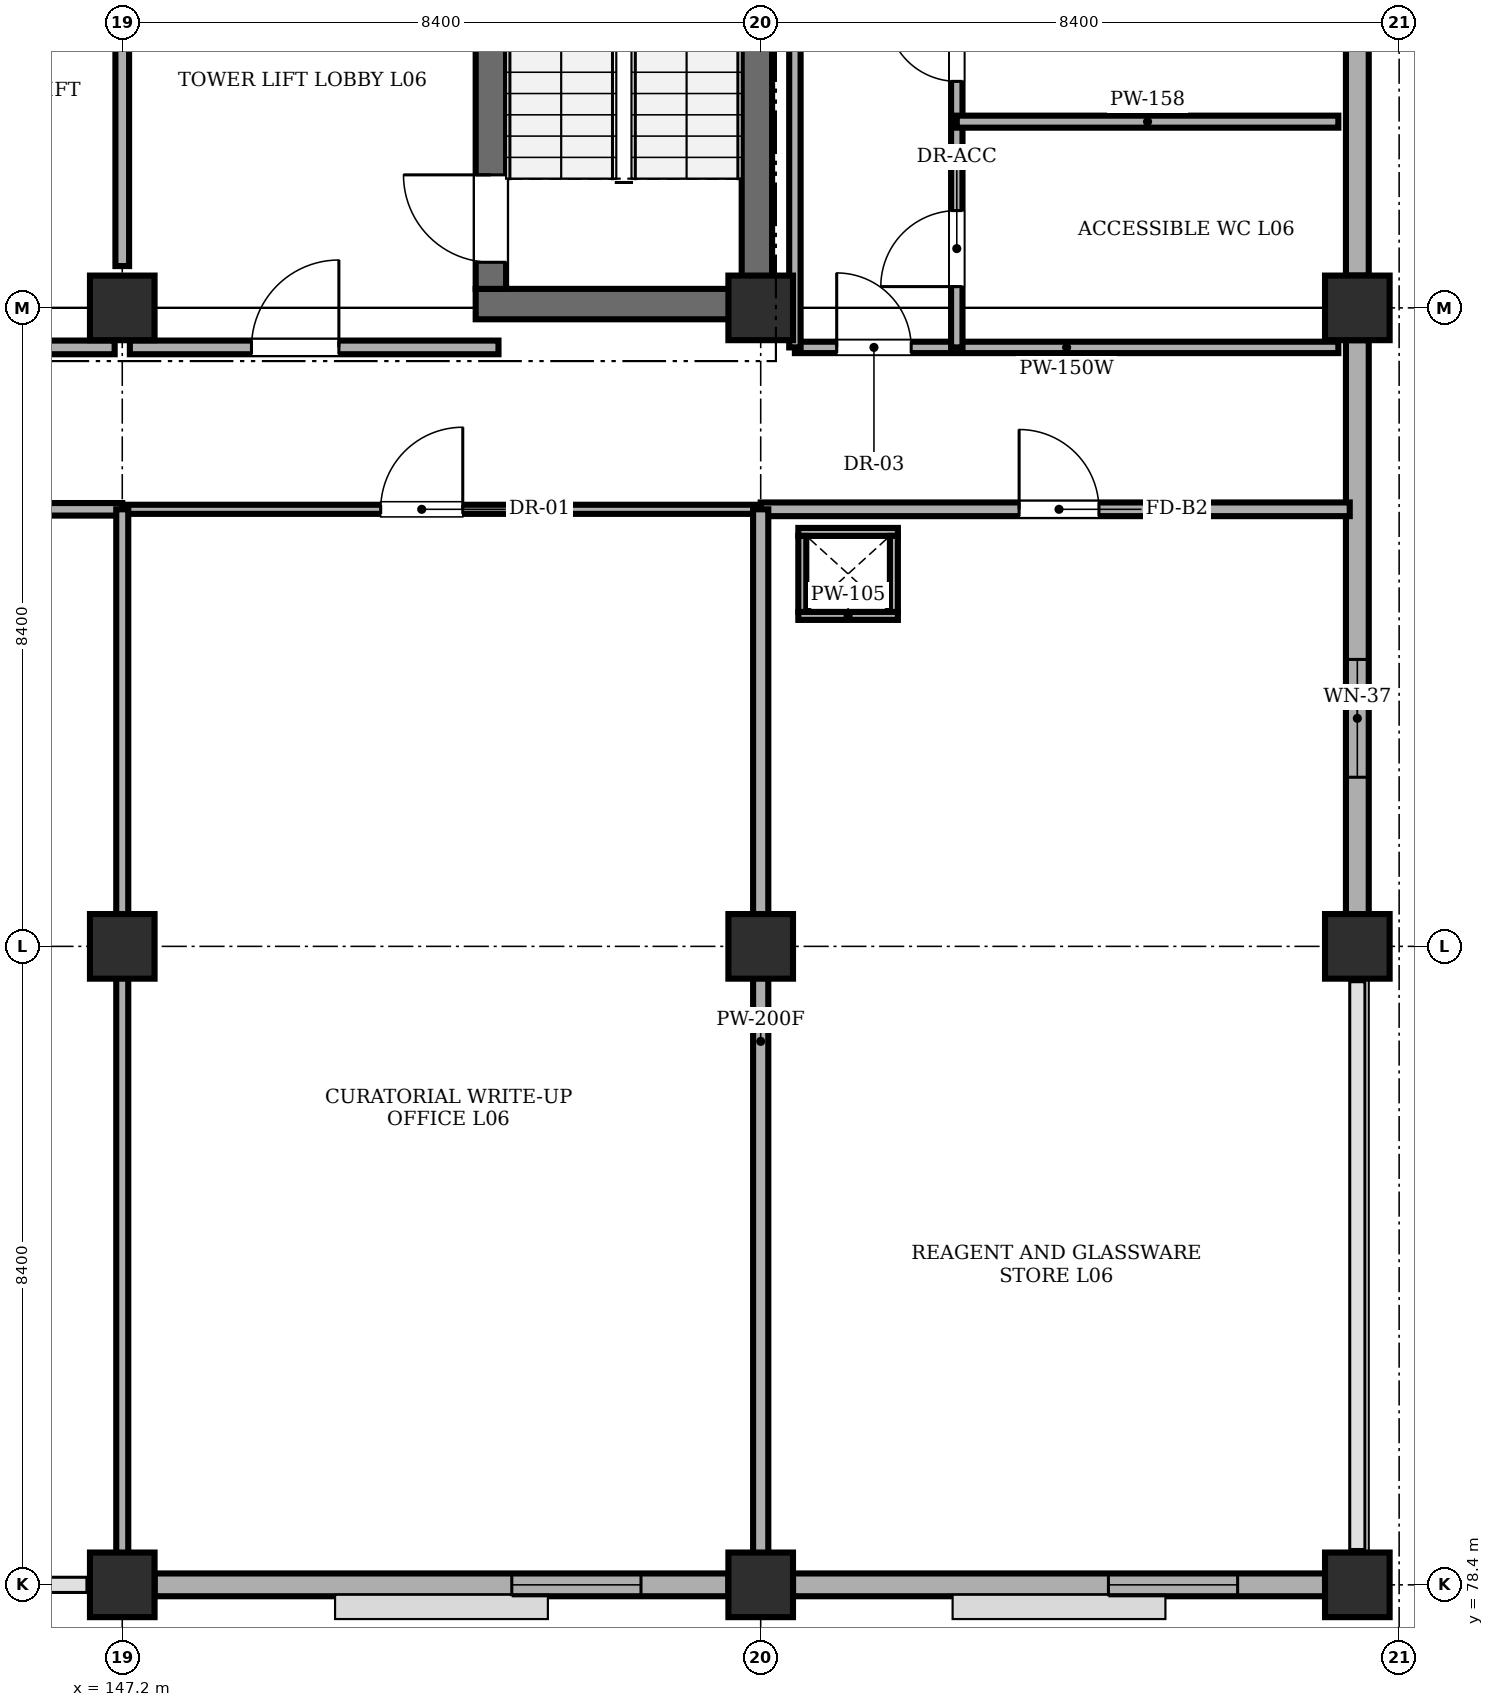
"""IFC4 building model, lengths in metres.
Left out: names, types, materials, properties, quantities, classifications, styles, units other than length and angle.
Written with IfcOpenShell. Run it as: python <this file> out.ifc"""

import sys

from ifc_helpers import new_model, si_unit, direction, frame, frame_2d, origin, origin_2d, place, context, subcontext, project, spatial, rectangle, extrude, element, fill, save


model = new_model("IFC4")
c1 = context("Model", 3, precision=1e-05, world=origin(), true_north=direction((0.0, 1.0)))
c2 = subcontext(c1, "Body", "Model", "MODEL_VIEW")
j1 = project(units=[si_unit("LENGTHUNIT", "METRE"), si_unit("PLANEANGLEUNIT", "RADIAN")], contexts=[c1])
p1 = place(None, origin())
s1 = spatial("IfcSite", under=j1, at=p1, CompositionType="ELEMENT")
p2 = place(p1, origin())
s2 = spatial("IfcBuilding", under=s1, at=p2, CompositionType="ELEMENT")
p3 = place(p2, frame((0.0, 0.0, 23.4)))
s3 = spatial("IfcBuildingStorey", under=s2, at=p3, CompositionType="ELEMENT", Elevation=23.4)
for number, where, z_axis, x_axis in (
    (1, (147.2, 78.4, 0.0), (0.0, 0.0, 1.0), (1.0, 0.0, 0.0)),
    (2, (147.2, 86.8, 0.0), (0.0, 0.0, 1.0), (1.0, 0.0, 0.0)),
    (3, (147.2, 95.2, 0.0), (0.0, 0.0, 1.0), (1.0, 0.0, 0.0)),
    (4, (155.6, 78.4, 0.0), (0.0, 0.0, 1.0), (1.0, 0.0, 0.0)),
    (5, (155.6, 86.8, 0.0), (0.0, 0.0, 1.0), (1.0, 0.0, 0.0)),
    (6, (155.6, 95.2, 0.0), (0.0, 0.0, 1.0), (1.0, 0.0, 0.0)),
    (7, (163.45, 78.4, 0.0), (0.0, 0.0, 1.0), (1.0, 0.0, 0.0)),
    (8, (163.45, 86.8, 0.0), (0.0, 0.0, 1.0), (1.0, 0.0, 0.0)),
    (9, (163.45, 95.2, 0.0), (0.0, 0.0, 1.0), (1.0, 0.0, 0.0)),
):
    element("IfcColumn", number, at=place(p3, frame(where, z_axis=z_axis, x_axis=x_axis)), inside=s3, PredefinedType="COLUMN", context=c2, shape_type="SweptSolid", body=[
        extrude(rectangle(XDim=0.85, YDim=0.85, at=origin_2d()), origin(), (0.0, 0.0, 1.0), 4.0),
    ])
p4 = place(p3, frame((151.85, 95.25, 0.0), z_axis=(0.0, 0.0, 1.0), x_axis=(1.0, 0.0, 0.0)))
e10 = element("IfcWall", 10, at=p4, inside=s3, PredefinedType="SHEAR", context=c2, shape_type="SweptSolid", body=[
    extrude(rectangle(XDim=3.9, YDim=0.4, at=frame_2d((1.95, 0.0))), origin(), (0.0, 0.0, 1.0), 4.0),
])
p5 = place(p3, frame((152.05, 95.45, 0.0), z_axis=(0.0, 0.0, 1.0), x_axis=(0.0, 1.0, 0.0)))
e11 = element("IfcWall", 11, at=p5, inside=s3, PredefinedType="SHEAR", context=c2, shape_type="SweptSolid", body=[
    extrude(rectangle(XDim=7.9, YDim=0.4, at=frame_2d((3.95, 0.0))), origin(), (0.0, 0.0, 1.0), 4.0),
])
p6 = place(p5, frame((0.35, 0.0, 0.0)))
e12 = element("IfcOpeningElement", 12, at=p6, cuts=e11, PredefinedType="OPENING", context=c2, shape_type="SweptSolid", body=[
    extrude(rectangle(XDim=1.15, YDim=2.15, at=frame_2d((0.575, 1.075))), frame((0.0, 0.21, 0.0), z_axis=(0.0, -1.0, 0.0), x_axis=(1.0, 0.0, 0.0)), (0.0, 0.0, 1.0), 0.42),
])
p7 = place(p3, frame((155.55, 95.45, 0.0), z_axis=(0.0, 0.0, 1.0), x_axis=(0.0, 1.0, 0.0)))
e13 = element("IfcWall", 13, at=p7, inside=s3, PredefinedType="SHEAR", context=c2, shape_type="SweptSolid", body=[
    extrude(rectangle(XDim=7.9, YDim=0.4, at=frame_2d((3.95, 0.0))), origin(), (0.0, 0.0, 1.0), 4.0),
])
p8 = place(p3, frame((155.175, 78.4, 0.0), z_axis=(0.0, 0.0, 1.0), x_axis=(-1.0, 0.0, 0.0)))
e14 = element("IfcWall", 14, at=p8, inside=s3, PredefinedType="STANDARD", context=c2, shape_type="SweptSolid", body=[
    extrude(rectangle(XDim=7.55, YDim=0.3, at=frame_2d((3.775, 0.0))), origin(), (0.0, 0.0, 1.0), 3.3),
])
p9 = place(p8, frame((1.15, 0.0, 0.95)))
e15 = element("IfcOpeningElement", 15, at=p9, cuts=e14, PredefinedType="OPENING", context=c2, shape_type="SweptSolid", body=[
    extrude(rectangle(XDim=1.7, YDim=2.05, at=frame_2d((0.85, 1.025))), frame((0.0, 0.16, 0.0), z_axis=(0.0, -1.0, 0.0), x_axis=(1.0, 0.0, 0.0)), (0.0, 0.0, 1.0), 0.32),
])
p10 = place(p3, frame((163.025, 78.4, 0.0), z_axis=(0.0, 0.0, 1.0), x_axis=(-1.0, 0.0, 0.0)))
e16 = element("IfcWall", 16, at=p10, inside=s3, PredefinedType="STANDARD", context=c2, shape_type="SweptSolid", body=[
    extrude(rectangle(XDim=7.0, YDim=0.3, at=frame_2d((3.5, 0.0))), origin(), (0.0, 0.0, 1.0), 3.3),
])
p11 = place(p10, frame((1.15, 0.0, 0.95)))
e17 = element("IfcOpeningElement", 17, at=p11, cuts=e16, PredefinedType="OPENING", context=c2, shape_type="SweptSolid", body=[
    extrude(rectangle(XDim=1.7, YDim=2.05, at=frame_2d((0.85, 1.025))), frame((0.0, 0.16, 0.0), z_axis=(0.0, -1.0, 0.0), x_axis=(1.0, 0.0, 0.0)), (0.0, 0.0, 1.0), 0.32),
])
p12 = place(p3, frame((163.45, 94.775, 0.0), z_axis=(0.0, 0.0, 1.0), x_axis=(0.0, -1.0, 0.0)))
e18 = element("IfcWall", 18, at=p12, inside=s3, PredefinedType="STANDARD", context=c2, shape_type="SweptSolid", body=[
    extrude(rectangle(XDim=7.55, YDim=0.3, at=frame_2d((3.775, 0.0))), origin(), (0.0, 0.0, 1.0), 3.3),
])
p13 = place(p12, frame((4.2, 0.0, 1.1)))
e19 = element("IfcOpeningElement", 19, at=p13, cuts=e18, PredefinedType="OPENING", context=c2, shape_type="SweptSolid", body=[
    extrude(rectangle(XDim=1.55, YDim=1.75, at=frame_2d((0.775, 0.875))), frame((0.0, 0.16, 0.0), z_axis=(0.0, -1.0, 0.0), x_axis=(1.0, 0.0, 0.0)), (0.0, 0.0, 1.0), 0.32),
])
p14 = place(p3, frame((163.45, 103.175, 0.0), z_axis=(0.0, 0.0, 1.0), x_axis=(0.0, -1.0, 0.0)))
e20 = element("IfcWall", 20, at=p14, inside=s3, PredefinedType="STANDARD", context=c2, shape_type="SweptSolid", body=[
    extrude(rectangle(XDim=7.55, YDim=0.3, at=frame_2d((3.775, 0.0))), origin(), (0.0, 0.0, 1.0), 3.3),
])
p15 = place(p14, frame((1.15, 0.0, 1.1)))
e21 = element("IfcOpeningElement", 21, at=p15, cuts=e20, PredefinedType="OPENING", context=c2, shape_type="SweptSolid", body=[
    extrude(rectangle(XDim=1.4, YDim=1.4, at=frame_2d((0.7, 0.7))), frame((0.0, 0.16, 0.0), z_axis=(0.0, -1.0, 0.0), x_axis=(1.0, 0.0, 0.0)), (0.0, 0.0, 1.0), 0.32),
])
p16 = place(p3, frame((142.3, 94.68, 0.0), z_axis=(0.0, 0.0, 1.0), x_axis=(1.0, 0.0, 0.0)))
e22 = element("IfcWall", 22, at=p16, inside=s3, PredefinedType="STANDARD", context=c2, shape_type="SweptSolid", body=[
    extrude(rectangle(XDim=4.8, YDim=0.18, at=frame_2d((2.4, 0.0))), origin(), (0.0, 0.0, 1.0), 4.0),
])
p17 = place(p16, frame((1.6, 0.0, 0.0)))
e23 = element("IfcOpeningElement", 23, at=p17, cuts=e22, PredefinedType="OPENING", context=c2, shape_type="SweptSolid", body=[
    extrude(rectangle(XDim=1.15, YDim=2.15, at=frame_2d((0.575, 1.075))), frame((0.0, 0.1, 0.0), z_axis=(0.0, -1.0, 0.0), x_axis=(1.0, 0.0, 0.0)), (0.0, 0.0, 1.0), 0.2),
])
p18 = place(p3, frame((147.3, 94.68, 0.0), z_axis=(0.0, 0.0, 1.0), x_axis=(1.0, 0.0, 0.0)))
e24 = element("IfcWall", 24, at=p18, inside=s3, PredefinedType="STANDARD", context=c2, shape_type="SweptSolid", body=[
    extrude(rectangle(XDim=4.85, YDim=0.18, at=frame_2d((2.425, 0.0))), origin(), (0.0, 0.0, 1.0), 4.0),
])
p19 = place(p18, frame((1.6, 0.0, 0.0)))
e25 = element("IfcOpeningElement", 25, at=p19, cuts=e24, PredefinedType="OPENING", context=c2, shape_type="SweptSolid", body=[
    extrude(rectangle(XDim=1.15, YDim=2.15, at=frame_2d((0.575, 1.075))), frame((0.0, 0.1, 0.0), z_axis=(0.0, -1.0, 0.0), x_axis=(1.0, 0.0, 0.0)), (0.0, 0.0, 1.0), 0.2),
])
p20 = place(p3, frame((147.2, 95.75, 0.0), z_axis=(0.0, 0.0, 1.0), x_axis=(0.0, 1.0, 0.0)))
e26 = element("IfcWall", 26, at=p20, inside=s3, PredefinedType="STANDARD", context=c2, shape_type="SweptSolid", body=[
    extrude(rectangle(XDim=4.5, YDim=0.18, at=frame_2d((2.25, 0.0))), origin(), (0.0, 0.0, 1.0), 3.3),
])
p21 = place(p3, frame((156.05, 94.68, 0.0), z_axis=(0.0, 0.0, 1.0), x_axis=(1.0, 0.0, 0.0)))
e27 = element("IfcWall", 27, at=p21, inside=s3, PredefinedType="PARTITIONING", context=c2, shape_type="SweptSolid", body=[
    extrude(rectangle(XDim=7.15, YDim=0.15, at=frame_2d((3.575, 0.0))), origin(), (0.0, 0.0, 1.0), 4.0),
])
p22 = place(p21, frame((0.55, 0.0, 0.0)))
e28 = element("IfcOpeningElement", 28, at=p22, cuts=e27, PredefinedType="OPENING", context=c2, shape_type="SweptSolid", body=[
    extrude(rectangle(XDim=0.98, YDim=2.12, at=frame_2d((0.49, 1.06))), frame((0.0, 0.085, 0.0), z_axis=(0.0, -1.0, 0.0), x_axis=(1.0, 0.0, 0.0)), (0.0, 0.0, 1.0), 0.17),
])
p23 = place(p3, frame((158.18, 94.68, 0.0), z_axis=(0.0, 0.0, 1.0), x_axis=(0.0, 1.0, 0.0)))
e29 = element("IfcWall", 29, at=p23, inside=s3, PredefinedType="PARTITIONING", context=c2, shape_type="SweptSolid", body=[
    extrude(rectangle(XDim=8.57, YDim=0.15, at=frame_2d((4.285, 0.0))), origin(), (0.0, 0.0, 1.0), 4.0),
])
p24 = place(p23, frame((0.8, 0.0, 0.0)))
e30 = element("IfcOpeningElement", 30, at=p24, cuts=e29, PredefinedType="OPENING", context=c2, shape_type="SweptSolid", body=[
    extrude(rectangle(XDim=1.0, YDim=2.12, at=frame_2d((0.5, 1.06))), frame((0.0, 0.085, 0.0), z_axis=(0.0, -1.0, 0.0), x_axis=(1.0, 0.0, 0.0)), (0.0, 0.0, 1.0), 0.17),
])
p25 = place(p23, frame((3.5, 0.0, 0.0)))
e31 = element("IfcOpeningElement", 31, at=p25, cuts=e29, PredefinedType="OPENING", context=c2, shape_type="SweptSolid", body=[
    extrude(rectangle(XDim=0.92, YDim=2.1, at=frame_2d((0.46, 1.05))), frame((0.0, 0.085, 0.0), z_axis=(0.0, -1.0, 0.0), x_axis=(1.0, 0.0, 0.0)), (0.0, 0.0, 1.0), 0.17),
])
p26 = place(p23, frame((6.4, 0.0, 0.0)))
e32 = element("IfcOpeningElement", 32, at=p26, cuts=e29, PredefinedType="OPENING", context=c2, shape_type="SweptSolid", body=[
    extrude(rectangle(XDim=0.92, YDim=2.1, at=frame_2d((0.46, 1.05))), frame((0.0, 0.085, 0.0), z_axis=(0.0, -1.0, 0.0), x_axis=(1.0, 0.0, 0.0)), (0.0, 0.0, 1.0), 0.17),
])
p27 = place(p3, frame((158.18, 97.65, 0.0), z_axis=(0.0, 0.0, 1.0), x_axis=(1.0, 0.0, 0.0)))
e33 = element("IfcWall", 33, at=p27, inside=s3, PredefinedType="PARTITIONING", context=c2, shape_type="SweptSolid", body=[
    extrude(rectangle(XDim=5.02, YDim=0.158, at=frame_2d((2.51, 0.0))), origin(), (0.0, 0.0, 1.0), 4.0),
])
p28 = place(p3, frame((156.05, 94.68, 0.0), z_axis=(0.0, 0.0, 1.0), x_axis=(0.0, 1.0, 0.0)))
e34 = element("IfcWall", 34, at=p28, inside=s3, PredefinedType="PARTITIONING", context=c2, shape_type="SweptSolid", body=[
    extrude(rectangle(XDim=8.57, YDim=0.15, at=frame_2d((4.285, 0.0))), origin(), (0.0, 0.0, 1.0), 4.0),
])
p29 = place(p3, frame((138.8, 92.55, 0.0), z_axis=(0.0, 0.0, 1.0), x_axis=(1.0, 0.0, 0.0)))
e35 = element("IfcWall", 35, at=p29, inside=s3, PredefinedType="PARTITIONING", context=c2, shape_type="SweptSolid", body=[
    extrude(rectangle(XDim=8.4, YDim=0.165, at=frame_2d((4.2, 0.0))), origin(), (0.0, 0.0, 1.0), 4.0),
])
p30 = place(p29, frame((3.4, 0.0, 0.0)))
e36 = element("IfcOpeningElement", 36, at=p30, cuts=e35, PredefinedType="OPENING", context=c2, shape_type="SweptSolid", body=[
    extrude(rectangle(XDim=1.12, YDim=2.18, at=frame_2d((0.56, 1.09))), frame((0.0, 0.093, 0.0), z_axis=(0.0, -1.0, 0.0), x_axis=(1.0, 0.0, 0.0)), (0.0, 0.0, 1.0), 0.185),
])
p31 = place(p3, frame((147.2, 92.55, 0.0), z_axis=(0.0, 0.0, 1.0), x_axis=(1.0, 0.0, 0.0)))
e37 = element("IfcWall", 37, at=p31, inside=s3, PredefinedType="PARTITIONING", context=c2, shape_type="SweptSolid", body=[
    extrude(rectangle(XDim=8.4, YDim=0.12, at=frame_2d((4.2, 0.0))), origin(), (0.0, 0.0, 1.0), 4.0),
])
p32 = place(p31, frame((3.4, 0.0, 0.0)))
e38 = element("IfcOpeningElement", 38, at=p32, cuts=e37, PredefinedType="OPENING", context=c2, shape_type="SweptSolid", body=[
    extrude(rectangle(XDim=1.08, YDim=2.15, at=frame_2d((0.54, 1.075))), frame((0.0, 0.07, 0.0), z_axis=(0.0, -1.0, 0.0), x_axis=(1.0, 0.0, 0.0)), (0.0, 0.0, 1.0), 0.14),
])
p33 = place(p3, frame((147.2, 78.55, 0.0), z_axis=(0.0, 0.0, 1.0), x_axis=(0.0, 1.0, 0.0)))
e39 = element("IfcWall", 39, at=p33, inside=s3, PredefinedType="PARTITIONING", context=c2, shape_type="SweptSolid", body=[
    extrude(rectangle(XDim=14.0, YDim=0.158, at=frame_2d((7.0, 0.0))), origin(), (0.0, 0.0, 1.0), 3.3),
])
p34 = place(p3, frame((155.6, 92.55, 0.0), z_axis=(0.0, 0.0, 1.0), x_axis=(1.0, 0.0, 0.0)))
e40 = element("IfcWall", 40, at=p34, inside=s3, PredefinedType="STANDARD", context=c2, shape_type="SweptSolid", body=[
    extrude(rectangle(XDim=7.75, YDim=0.18, at=frame_2d((3.875, 0.0))), origin(), (0.0, 0.0, 1.0), 4.0),
])
p35 = place(p34, frame((3.4, 0.0, 0.0)))
e41 = element("IfcOpeningElement", 41, at=p35, cuts=e40, PredefinedType="OPENING", context=c2, shape_type="SweptSolid", body=[
    extrude(rectangle(XDim=1.05, YDim=2.15, at=frame_2d((0.525, 1.075))), frame((0.0, 0.1, 0.0), z_axis=(0.0, -1.0, 0.0), x_axis=(1.0, 0.0, 0.0)), (0.0, 0.0, 1.0), 0.2),
])
p36 = place(p3, frame((155.6, 78.55, 0.0), z_axis=(0.0, 0.0, 1.0), x_axis=(0.0, 1.0, 0.0)))
e42 = element("IfcWall", 42, at=p36, inside=s3, PredefinedType="SOLIDWALL", context=c2, shape_type="SweptSolid", body=[
    extrude(rectangle(XDim=14.0, YDim=0.2, at=frame_2d((7.0, 0.0))), origin(), (0.0, 0.0, 1.0), 3.3),
])
for number, where, z_axis, x_axis in (
    (43, (156.095, 91.147, 0.0), (0.0, 0.0, 1.0), (1.0, 0.0, 0.0)),
    (44, (156.095, 92.252, 0.0), (0.0, 0.0, 1.0), (1.0, 0.0, 0.0)),
):
    element("IfcWall", number, at=place(p3, frame(where, z_axis=z_axis, x_axis=x_axis)), inside=s3, PredefinedType="PARTITIONING", context=c2, shape_type="SweptSolid", body=[
        extrude(rectangle(XDim=1.31, YDim=0.105, at=frame_2d((0.655, 0.0))), origin(), (0.0, 0.0, 1.0), 4.0),
    ])
for number, where, z_axis, x_axis in (
    (45, (156.147, 91.2, 0.0), (0.0, 0.0, 1.0), (0.0, 1.0, 0.0)),
    (46, (157.353, 91.2, 0.0), (0.0, 0.0, 1.0), (0.0, 1.0, 0.0)),
):
    element("IfcWall", number, at=place(p3, frame(where, z_axis=z_axis, x_axis=x_axis)), inside=s3, PredefinedType="PARTITIONING", context=c2, shape_type="SweptSolid", body=[
        extrude(rectangle(XDim=1.0, YDim=0.105, at=frame_2d((0.5, 0.0))), origin(), (0.0, 0.0, 1.0), 4.0),
    ])
p37 = place(p9, origin())
e47 = element("IfcWindow", 47, at=p37, inside=s3, PartitioningType="DOUBLE_PANEL_VERTICAL", PredefinedType="WINDOW", context=c2, shape_type="SweptSolid", body=[
    extrude(rectangle(XDim=1.7, YDim=2.05, at=frame_2d((0.85, 1.025))), frame((0.0, 0.03, 0.0), z_axis=(0.0, -1.0, 0.0), x_axis=(1.0, 0.0, 0.0)), (0.0, 0.0, 1.0), 0.06),
])
fill(e15, e47)
p38 = place(p11, origin())
e48 = element("IfcWindow", 48, at=p38, inside=s3, PartitioningType="DOUBLE_PANEL_VERTICAL", PredefinedType="WINDOW", context=c2, shape_type="SweptSolid", body=[
    extrude(rectangle(XDim=1.7, YDim=2.05, at=frame_2d((0.85, 1.025))), frame((0.0, 0.03, 0.0), z_axis=(0.0, -1.0, 0.0), x_axis=(1.0, 0.0, 0.0)), (0.0, 0.0, 1.0), 0.06),
])
fill(e17, e48)
p39 = place(p13, origin())
e49 = element("IfcWindow", 49, at=p39, inside=s3, PartitioningType="DOUBLE_PANEL_VERTICAL", PredefinedType="WINDOW", context=c2, shape_type="SweptSolid", body=[
    extrude(rectangle(XDim=1.55, YDim=1.75, at=frame_2d((0.775, 0.875))), frame((0.0, 0.03, 0.0), z_axis=(0.0, -1.0, 0.0), x_axis=(1.0, 0.0, 0.0)), (0.0, 0.0, 1.0), 0.06),
])
fill(e19, e49)
p40 = place(p19, origin())
e50 = element("IfcDoor", 50, at=p40, inside=s3, OperationType="SINGLE_SWING_RIGHT", PredefinedType="DOOR", context=c2, shape_type="SweptSolid", body=[
    extrude(rectangle(XDim=1.15, YDim=2.15, at=frame_2d((0.575, 1.075))), frame((0.0, 0.025, 0.0), z_axis=(0.0, -1.0, 0.0), x_axis=(1.0, 0.0, 0.0)), (0.0, 0.0, 1.0), 0.05),
])
fill(e25, e50)
p41 = place(p22, origin())
e51 = element("IfcDoor", 51, at=p41, inside=s3, OperationType="SINGLE_SWING_LEFT", PredefinedType="DOOR", context=c2, shape_type="SweptSolid", body=[
    extrude(rectangle(XDim=0.98, YDim=2.12, at=frame_2d((0.49, 1.06))), frame((0.0, 0.025, 0.0), z_axis=(0.0, -1.0, 0.0), x_axis=(1.0, 0.0, 0.0)), (0.0, 0.0, 1.0), 0.05),
])
fill(e28, e51)
p42 = place(p24, origin())
e52 = element("IfcDoor", 52, at=p42, inside=s3, OperationType="SINGLE_SWING_LEFT", PredefinedType="DOOR", context=c2, shape_type="SweptSolid", body=[
    extrude(rectangle(XDim=1.0, YDim=2.12, at=frame_2d((0.5, 1.06))), frame((0.0, 0.025, 0.0), z_axis=(0.0, -1.0, 0.0), x_axis=(1.0, 0.0, 0.0)), (0.0, 0.0, 1.0), 0.05),
])
fill(e30, e52)
p43 = place(p25, origin())
e53 = element("IfcDoor", 53, at=p43, inside=s3, OperationType="SINGLE_SWING_RIGHT", PredefinedType="DOOR", context=c2, shape_type="SweptSolid", body=[
    extrude(rectangle(XDim=0.92, YDim=2.1, at=frame_2d((0.46, 1.05))), frame((0.0, 0.025, 0.0), z_axis=(0.0, -1.0, 0.0), x_axis=(1.0, 0.0, 0.0)), (0.0, 0.0, 1.0), 0.05),
])
fill(e31, e53)
p44 = place(p32, origin())
e54 = element("IfcDoor", 54, at=p44, inside=s3, OperationType="SINGLE_SWING_RIGHT", PredefinedType="DOOR", context=c2, shape_type="SweptSolid", body=[
    extrude(rectangle(XDim=1.08, YDim=2.15, at=frame_2d((0.54, 1.075))), frame((0.0, 0.025, 0.0), z_axis=(0.0, -1.0, 0.0), x_axis=(1.0, 0.0, 0.0)), (0.0, 0.0, 1.0), 0.05),
])
fill(e38, e54)
p45 = place(p35, origin())
e55 = element("IfcDoor", 55, at=p45, inside=s3, OperationType="SINGLE_SWING_LEFT", PredefinedType="DOOR", context=c2, shape_type="SweptSolid", body=[
    extrude(rectangle(XDim=1.05, YDim=2.15, at=frame_2d((0.525, 1.075))), frame((0.0, 0.025, 0.0), z_axis=(0.0, -1.0, 0.0), x_axis=(1.0, 0.0, 0.0)), (0.0, 0.0, 1.0), 0.05),
])
fill(e41, e55)
p46 = place(p6, origin())
e56 = element("IfcDoor", 56, at=p46, inside=s3, OperationType="SINGLE_SWING_RIGHT", PredefinedType="DOOR", context=c2, shape_type="SweptSolid", body=[
    extrude(rectangle(XDim=1.15, YDim=2.15, at=frame_2d((0.575, 1.075))), frame((0.0, 0.025, 0.0), z_axis=(0.0, -1.0, 0.0), x_axis=(1.0, 0.0, 0.0)), (0.0, 0.0, 1.0), 0.05),
])
fill(e12, e56)
save(model, sys.argv[1])
